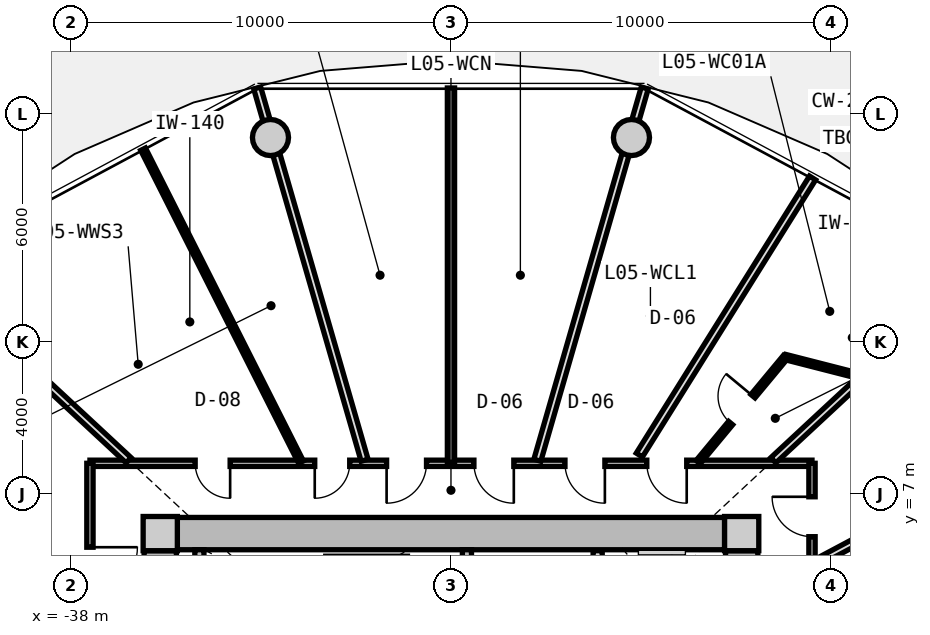
"""IFC4 building model, lengths in metres.
Left out: names, types, materials, properties, quantities, classifications, styles, units other than length and angle.
Written with IfcOpenShell. Run it as: python <this file> out.ifc"""

import sys

from ifc_helpers import new_model, si_unit, direction, frame, frame_2d, origin, origin_2d, place, context, subcontext, project, spatial, rectangle, circle, extrude, source, transform, mapped, element, fill, save


model = new_model("IFC4")
c1 = context("Model", 3, precision=1e-05, world=origin(), true_north=direction((0.0, 1.0)))
c2 = subcontext(c1, "Body", "Model", "MODEL_VIEW")
j1 = project(units=[si_unit("LENGTHUNIT", "METRE"), si_unit("PLANEANGLEUNIT", "RADIAN")], contexts=[c1])
p1 = place(None, origin())
s1 = spatial("IfcSite", under=j1, at=p1, CompositionType="ELEMENT")
p2 = place(p1, origin())
s2 = spatial("IfcBuilding", under=s1, at=p2, CompositionType="ELEMENT")
p3 = place(p2, frame((0.0, 0.0, 21.6)))
s3 = spatial("IfcBuildingStorey", under=s2, at=p3, CompositionType="ELEMENT", Elevation=21.6)
m1 = source(origin(), c2, "Body", "SweptSolid", [
    extrude(rectangle(XDim=0.9, YDim=0.9, at=origin_2d()), origin(), (0.0, 0.0, 1.0), 3.05),
])
for number, where, z_axis, x_axis in (
    (1, (-20.35, 5.95, 0.0), (0.0, 0.0, 1.0), (1.0, 0.0, 0.0)),
    (2, (-35.65, 5.95, 0.0), (0.0, 0.0, 1.0), (1.0, 0.0, 0.0)),
):
    element("IfcColumn", number, at=place(p3, frame(where, z_axis=z_axis, x_axis=x_axis)), inside=s3, PredefinedType="COLUMN", context=c2, shape_type="MappedRepresentation", body=[
        mapped(m1, transform((0.0, 0.0, 0.0), x_axis=(1.0, 0.0, 0.0), y_axis=(0.0, 1.0, 0.0), z_axis=(0.0, 0.0, 1.0), scale=1.0)),
    ])
m2 = source(origin(), c2, "Body", "SweptSolid", [
    extrude(rectangle(XDim=14.4, YDim=0.85, at=frame_2d((7.2, 0.0))), origin(), (0.0, 0.0, 1.0), 2.79),
])
p4 = place(p3, frame((-35.2, 5.95, 0.0), z_axis=(0.0, 0.0, 1.0), x_axis=(1.0, 0.0, 0.0)))
e3 = element("IfcWall", 3, at=p4, inside=s3, PredefinedType="SHEAR", context=c2, shape_type="MappedRepresentation", body=[
    mapped(m2, transform((0.0, 0.0, 0.0), x_axis=(1.0, 0.0, 0.0), y_axis=(0.0, 1.0, 0.0), z_axis=(0.0, 0.0, 1.0), scale=1.0)),
])
m3 = source(origin(), c2, "Body", "SweptSolid", [
    extrude(rectangle(XDim=11.0, YDim=0.85, at=frame_2d((5.5, 0.0))), origin(), (0.0, 0.0, 1.0), 2.79),
])
p5 = place(p3, frame((-35.65, -5.5, 0.0), z_axis=(0.0, 0.0, 1.0), x_axis=(0.0, 1.0, 0.0)))
e4 = element("IfcWall", 4, at=p5, inside=s3, PredefinedType="SHEAR", context=c2, shape_type="MappedRepresentation", body=[
    mapped(m3, transform((0.0, 0.0, 0.0), x_axis=(1.0, 0.0, 0.0), y_axis=(0.0, 1.0, 0.0), z_axis=(0.0, 0.0, 1.0), scale=1.0)),
])
p6 = place(p5, frame((3.8, 0.0, 0.0)))
e5 = element("IfcOpeningElement", 5, at=p6, cuts=e4, PredefinedType="OPENING", context=c2, shape_type="SweptSolid", body=[
    extrude(rectangle(XDim=1.2, YDim=2.15, at=frame_2d((0.6, 1.075))), frame((0.0, 0.435, 0.0), z_axis=(0.0, -1.0, 0.0), x_axis=(1.0, 0.0, 0.0)), (0.0, 0.0, 1.0), 0.87),
])
p7 = place(p3, frame((-20.35, 5.5, 0.0), z_axis=(0.0, 0.0, 1.0), x_axis=(0.0, -1.0, 0.0)))
e6 = element("IfcWall", 6, at=p7, inside=s3, PredefinedType="SHEAR", context=c2, shape_type="MappedRepresentation", body=[
    mapped(m3, transform((0.0, 0.0, 0.0), x_axis=(1.0, 0.0, 0.0), y_axis=(0.0, 1.0, 0.0), z_axis=(0.0, 0.0, 1.0), scale=1.0)),
])
p8 = place(p7, frame((5.65, 0.0, 0.0)))
e7 = element("IfcOpeningElement", 7, at=p8, cuts=e6, PredefinedType="OPENING", context=c2, shape_type="SweptSolid", body=[
    extrude(rectangle(XDim=1.2, YDim=2.15, at=frame_2d((0.6, 1.075))), frame((0.0, 0.435, 0.0), z_axis=(0.0, -1.0, 0.0), x_axis=(1.0, 0.0, 0.0)), (0.0, 0.0, 1.0), 0.87),
])
p9 = place(p7, frame((9.3, 0.0, 0.0)))
e8 = element("IfcOpeningElement", 8, at=p9, cuts=e6, PredefinedType="OPENING", context=c2, shape_type="SweptSolid", body=[
    extrude(rectangle(XDim=1.0, YDim=2.1, at=frame_2d((0.5, 1.05))), frame((0.0, 0.435, 0.0), z_axis=(0.0, -1.0, 0.0), x_axis=(1.0, 0.0, 0.0)), (0.0, 0.0, 1.0), 0.87),
])
m4 = source(origin(), c2, "Body", "SweptSolid", [
    extrude(circle(Radius=0.475, at=origin_2d()), origin(), (0.0, 0.0, 1.0), 3.47),
])
for number, where, z_axis, x_axis in (
    (9, (-23.251, 16.373, -0.42), (0.0, 0.0, 1.0), (1.0, 0.0, 0.0)),
    (10, (-32.749, 16.373, -0.42), (0.0, 0.0, 1.0), (1.0, 0.0, 0.0)),
):
    element("IfcColumn", number, at=place(p3, frame(where, z_axis=z_axis, x_axis=x_axis)), inside=s3, PredefinedType="COLUMN", context=c2, shape_type="MappedRepresentation", body=[
        mapped(m4, transform((0.0, 0.0, 0.0), x_axis=(1.0, 0.0, 0.0), y_axis=(0.0, 1.0, 0.0), z_axis=(0.0, 0.0, 1.0), scale=1.0)),
    ])
m5 = source(origin(), c2, "Body", "SweptSolid", [
    extrude(rectangle(XDim=3.075, YDim=0.24, at=frame_2d((1.538, 0.0))), origin(), (0.0, 0.0, 1.0), 2.79),
])
p10 = place(p3, frame((-34.62, 2.45, 0.0), z_axis=(0.0, 0.0, 1.0), x_axis=(0.0, 1.0, 0.0)))
e11 = element("IfcWall", 11, at=p10, inside=s3, PredefinedType="PARTITIONING", context=c2, shape_type="MappedRepresentation", body=[
    mapped(m5, transform((0.0, 0.0, 0.0), x_axis=(1.0, 0.0, 0.0), y_axis=(0.0, 1.0, 0.0), z_axis=(0.0, 0.0, 1.0), scale=1.0)),
])
p11 = place(p3, frame((-27.58, 2.45, 0.0), z_axis=(0.0, 0.0, 1.0), x_axis=(0.0, 1.0, 0.0)))
e12 = element("IfcWall", 12, at=p11, inside=s3, PredefinedType="PARTITIONING", context=c2, shape_type="MappedRepresentation", body=[
    mapped(m5, transform((0.0, 0.0, 0.0), x_axis=(1.0, 0.0, 0.0), y_axis=(0.0, 1.0, 0.0), z_axis=(0.0, 0.0, 1.0), scale=1.0)),
])
p12 = place(p11, frame((0.55, 0.0, 0.0)))
e13 = element("IfcOpeningElement", 13, at=p12, cuts=e12, PredefinedType="OPENING", context=c2, shape_type="SweptSolid", body=[
    extrude(rectangle(XDim=1.1, YDim=2.15, at=frame_2d((0.55, 1.075))), frame((0.0, 0.13, 0.0), z_axis=(0.0, -1.0, 0.0), x_axis=(1.0, 0.0, 0.0)), (0.0, 0.0, 1.0), 0.26),
])
m6 = source(origin(), c2, "Body", "SweptSolid", [
    extrude(rectangle(XDim=5.0, YDim=0.24, at=frame_2d((2.5, 0.0))), origin(), (0.0, 0.0, 1.0), 2.775),
])
p13 = place(p3, frame((-24.14, 0.5, 0.0), z_axis=(0.0, 0.0, 1.0), x_axis=(0.0, 1.0, 0.0)))
e14 = element("IfcWall", 14, at=p13, inside=s3, PredefinedType="PARTITIONING", context=c2, shape_type="MappedRepresentation", body=[
    mapped(m6, transform((0.0, 0.0, 0.0), x_axis=(1.0, 0.0, 0.0), y_axis=(0.0, 1.0, 0.0), z_axis=(0.0, 0.0, 1.0), scale=1.0)),
])
p14 = place(p13, frame((3.05, 0.0, 0.0)))
e15 = element("IfcOpeningElement", 15, at=p14, cuts=e14, PredefinedType="OPENING", context=c2, shape_type="SweptSolid", body=[
    extrude(rectangle(XDim=1.3, YDim=2.2, at=frame_2d((0.65, 1.1))), frame((0.0, 0.13, 0.0), z_axis=(0.0, -1.0, 0.0), x_axis=(1.0, 0.0, 0.0)), (0.0, 0.0, 1.0), 0.26),
])
p15 = place(p13, frame((0.55, 0.0, 0.0)))
e16 = element("IfcOpeningElement", 16, at=p15, cuts=e14, PredefinedType="OPENING", context=c2, shape_type="SweptSolid", body=[
    extrude(rectangle(XDim=1.3, YDim=2.2, at=frame_2d((0.65, 1.1))), frame((0.0, 0.13, 0.0), z_axis=(0.0, -1.0, 0.0), x_axis=(1.0, 0.0, 0.0)), (0.0, 0.0, 1.0), 0.26),
])
m7 = source(origin(), c2, "Body", "SweptSolid", [
    extrude(rectangle(XDim=19.0, YDim=0.165, at=frame_2d((9.5, 0.0))), origin(), (0.0, 0.0, 1.0), 2.775),
])
p16 = place(p3, frame((-37.5, 7.8, 0.0), z_axis=(0.0, 0.0, 1.0), x_axis=(1.0, 0.0, 0.0)))
e17 = element("IfcWall", 17, at=p16, inside=s3, PredefinedType="PARTITIONING", context=c2, shape_type="MappedRepresentation", body=[
    mapped(m7, transform((0.0, 0.0, 0.0), x_axis=(1.0, 0.0, 0.0), y_axis=(0.0, 1.0, 0.0), z_axis=(0.0, 0.0, 1.0), scale=1.0)),
])
p17 = place(p16, frame((14.653, 0.0, 0.0)))
e18 = element("IfcOpeningElement", 18, at=p17, cuts=e17, PredefinedType="OPENING", context=c2, shape_type="SweptSolid", body=[
    extrude(rectangle(XDim=1.05, YDim=2.15, at=frame_2d((0.525, 1.075))), frame((0.0, 0.093, 0.0), z_axis=(0.0, -1.0, 0.0), x_axis=(1.0, 0.0, 0.0)), (0.0, 0.0, 1.0), 0.185),
])
p18 = place(p16, frame((12.5, 0.0, 0.0)))
e19 = element("IfcOpeningElement", 19, at=p18, cuts=e17, PredefinedType="OPENING", context=c2, shape_type="SweptSolid", body=[
    extrude(rectangle(XDim=1.05, YDim=2.15, at=frame_2d((0.525, 1.075))), frame((0.0, 0.093, 0.0), z_axis=(0.0, -1.0, 0.0), x_axis=(1.0, 0.0, 0.0)), (0.0, 0.0, 1.0), 0.185),
])
p19 = place(p16, frame((10.104, 0.0, 0.0)))
e20 = element("IfcOpeningElement", 20, at=p19, cuts=e17, PredefinedType="OPENING", context=c2, shape_type="SweptSolid", body=[
    extrude(rectangle(XDim=1.05, YDim=2.15, at=frame_2d((0.525, 1.075))), frame((0.0, 0.093, 0.0), z_axis=(0.0, -1.0, 0.0), x_axis=(1.0, 0.0, 0.0)), (0.0, 0.0, 1.0), 0.185),
])
p20 = place(p16, frame((7.806, 0.0, 0.0)))
e21 = element("IfcOpeningElement", 21, at=p20, cuts=e17, PredefinedType="OPENING", context=c2, shape_type="SweptSolid", body=[
    extrude(rectangle(XDim=1.05, YDim=2.15, at=frame_2d((0.525, 1.075))), frame((0.0, 0.093, 0.0), z_axis=(0.0, -1.0, 0.0), x_axis=(1.0, 0.0, 0.0)), (0.0, 0.0, 1.0), 0.185),
])
p21 = place(p16, frame((5.915, 0.0, 0.0)))
e22 = element("IfcOpeningElement", 22, at=p21, cuts=e17, PredefinedType="OPENING", context=c2, shape_type="SweptSolid", body=[
    extrude(rectangle(XDim=0.92, YDim=2.1, at=frame_2d((0.46, 1.05))), frame((0.0, 0.093, 0.0), z_axis=(0.0, -1.0, 0.0), x_axis=(1.0, 0.0, 0.0)), (0.0, 0.0, 1.0), 0.185),
])
p22 = place(p16, frame((2.769, 0.0, 0.0)))
e23 = element("IfcOpeningElement", 23, at=p22, cuts=e17, PredefinedType="OPENING", context=c2, shape_type="SweptSolid", body=[
    extrude(rectangle(XDim=0.92, YDim=2.1, at=frame_2d((0.46, 1.05))), frame((0.0, 0.093, 0.0), z_axis=(0.0, -1.0, 0.0), x_axis=(1.0, 0.0, 0.0)), (0.0, 0.0, 1.0), 0.185),
])
m8 = source(origin(), c2, "Body", "SweptSolid", [
    extrude(rectangle(XDim=15.6, YDim=0.165, at=frame_2d((7.8, 0.0))), origin(), (0.0, 0.0, 1.0), 2.775),
])
p23 = place(p3, frame((-37.5, -7.8, 0.0), z_axis=(0.0, 0.0, 1.0), x_axis=(0.0, 1.0, 0.0)))
e24 = element("IfcWall", 24, at=p23, inside=s3, PredefinedType="PARTITIONING", context=c2, shape_type="MappedRepresentation", body=[
    mapped(m8, transform((0.0, 0.0, 0.0), x_axis=(1.0, 0.0, 0.0), y_axis=(0.0, 1.0, 0.0), z_axis=(0.0, 0.0, 1.0), scale=1.0)),
])
p24 = place(p23, frame((12.141, 0.0, 0.0)))
e25 = element("IfcOpeningElement", 25, at=p24, cuts=e24, PredefinedType="OPENING", context=c2, shape_type="SweptSolid", body=[
    extrude(rectangle(XDim=1.25, YDim=2.2, at=frame_2d((0.625, 1.1))), frame((0.0, 0.093, 0.0), z_axis=(0.0, -1.0, 0.0), x_axis=(1.0, 0.0, 0.0)), (0.0, 0.0, 1.0), 0.185),
])
p25 = place(p23, frame((7.175, 0.0, 0.0)))
e26 = element("IfcOpeningElement", 26, at=p25, cuts=e24, PredefinedType="OPENING", context=c2, shape_type="SweptSolid", body=[
    extrude(rectangle(XDim=1.25, YDim=2.2, at=frame_2d((0.625, 1.1))), frame((0.0, 0.093, 0.0), z_axis=(0.0, -1.0, 0.0), x_axis=(1.0, 0.0, 0.0)), (0.0, 0.0, 1.0), 0.185),
])
p26 = place(p23, frame((2.208, 0.0, 0.0)))
e27 = element("IfcOpeningElement", 27, at=p26, cuts=e24, PredefinedType="OPENING", context=c2, shape_type="SweptSolid", body=[
    extrude(rectangle(XDim=1.25, YDim=2.2, at=frame_2d((0.625, 1.1))), frame((0.0, 0.093, 0.0), z_axis=(0.0, -1.0, 0.0), x_axis=(1.0, 0.0, 0.0)), (0.0, 0.0, 1.0), 0.185),
])
p27 = place(p3, frame((-18.5, 7.8, 0.0), z_axis=(0.0, 0.0, 1.0), x_axis=(0.0, -1.0, 0.0)))
e28 = element("IfcWall", 28, at=p27, inside=s3, PredefinedType="PARTITIONING", context=c2, shape_type="MappedRepresentation", body=[
    mapped(m8, transform((0.0, 0.0, 0.0), x_axis=(1.0, 0.0, 0.0), y_axis=(0.0, 1.0, 0.0), z_axis=(0.0, 0.0, 1.0), scale=1.0)),
])
p28 = place(p27, frame((12.141, 0.0, 0.0)))
e29 = element("IfcOpeningElement", 29, at=p28, cuts=e28, PredefinedType="OPENING", context=c2, shape_type="SweptSolid", body=[
    extrude(rectangle(XDim=1.25, YDim=2.2, at=frame_2d((0.625, 1.1))), frame((0.0, 0.093, 0.0), z_axis=(0.0, -1.0, 0.0), x_axis=(1.0, 0.0, 0.0)), (0.0, 0.0, 1.0), 0.185),
])
p29 = place(p27, frame((7.175, 0.0, 0.0)))
e30 = element("IfcOpeningElement", 30, at=p29, cuts=e28, PredefinedType="OPENING", context=c2, shape_type="SweptSolid", body=[
    extrude(rectangle(XDim=1.25, YDim=2.2, at=frame_2d((0.625, 1.1))), frame((0.0, 0.093, 0.0), z_axis=(0.0, -1.0, 0.0), x_axis=(1.0, 0.0, 0.0)), (0.0, 0.0, 1.0), 0.185),
])
p30 = place(p27, frame((2.826, 0.0, 0.0)))
e31 = element("IfcOpeningElement", 31, at=p30, cuts=e28, PredefinedType="OPENING", context=c2, shape_type="SweptSolid", body=[
    extrude(rectangle(XDim=1.05, YDim=2.15, at=frame_2d((0.525, 1.075))), frame((0.0, 0.093, 0.0), z_axis=(0.0, -1.0, 0.0), x_axis=(1.0, 0.0, 0.0)), (0.0, 0.0, 1.0), 0.185),
])
p31 = place(p27, frame((0.881, 0.0, 0.0)))
e32 = element("IfcOpeningElement", 32, at=p31, cuts=e28, PredefinedType="OPENING", context=c2, shape_type="SweptSolid", body=[
    extrude(rectangle(XDim=1.05, YDim=2.15, at=frame_2d((0.525, 1.075))), frame((0.0, 0.093, 0.0), z_axis=(0.0, -1.0, 0.0), x_axis=(1.0, 0.0, 0.0)), (0.0, 0.0, 1.0), 0.185),
])
m9 = source(origin(), c2, "Body", "SweptSolid", [
    extrude(rectangle(XDim=7.435, YDim=0.19, at=frame_2d((3.717, 0.0))), origin(), (0.0, 0.0, 1.0), 2.225),
])
p32 = place(p3, frame((-19.517, 7.88, 0.0), z_axis=(0.0, 0.0, 1.0), x_axis=(0.732651956848, 0.680603489652, 0.0)))
e33 = element("IfcWall", 33, at=p32, inside=s3, PredefinedType="PARTITIONING", context=c2, shape_type="MappedRepresentation", body=[
    mapped(m9, transform((0.0, 0.0, 0.0), x_axis=(1.0, 0.0, 0.0), y_axis=(0.0, 1.0, 0.0), z_axis=(0.0, 0.0, 1.0), scale=1.0)),
])
m10 = source(origin(), c2, "Body", "SweptSolid", [
    extrude(rectangle(XDim=10.196, YDim=0.19, at=frame_2d((5.098, 0.0))), origin(), (0.0, 0.0, 1.0), 2.225),
])
p33 = place(p3, frame((-25.727, 7.88, 0.0), z_axis=(0.0, 0.0, 1.0), x_axis=(0.277136420347, 0.960830580549, 0.0)))
e34 = element("IfcWall", 34, at=p33, inside=s3, PredefinedType="PARTITIONING", context=c2, shape_type="MappedRepresentation", body=[
    mapped(m10, transform((0.0, 0.0, 0.0), x_axis=(1.0, 0.0, 0.0), y_axis=(0.0, 1.0, 0.0), z_axis=(0.0, 0.0, 1.0), scale=1.0)),
])
m11 = source(origin(), c2, "Body", "SweptSolid", [
    extrude(rectangle(XDim=8.598, YDim=0.19, at=frame_2d((4.299, 0.0))), origin(), (0.0, 0.0, 1.0), 2.775),
])
p34 = place(p3, frame((-23.043, 8.017, 0.0), z_axis=(0.0, 0.0, 1.0), x_axis=(0.530039776395, 0.847972779893, 0.0)))
e35 = element("IfcWall", 35, at=p34, inside=s3, PredefinedType="PARTITIONING", context=c2, shape_type="MappedRepresentation", body=[
    mapped(m11, transform((0.0, 0.0, 0.0), x_axis=(1.0, 0.0, 0.0), y_axis=(0.0, 1.0, 0.0), z_axis=(0.0, 0.0, 1.0), scale=1.0)),
])
m12 = source(origin(), c2, "Body", "SweptSolid", [
    extrude(rectangle(XDim=3.594, YDim=0.14, at=frame_2d((1.797, 0.0))), origin(), (0.0, 0.0, 1.0), 2.775),
])
p35 = place(p3, frame((-21.496, 7.83, 0.0), z_axis=(0.0, 0.0, 1.0), x_axis=(0.639001147083, 0.769205781326, 0.0)))
e36 = element("IfcWall", 36, at=p35, inside=s3, PredefinedType="PARTITIONING", context=c2, shape_type="MappedRepresentation", body=[
    mapped(m12, transform((0.0, 0.0, 0.0), x_axis=(1.0, 0.0, 0.0), y_axis=(0.0, 1.0, 0.0), z_axis=(0.0, 0.0, 1.0), scale=1.0)),
])
p36 = place(p35, frame((1.337, 0.0, 0.0)))
e37 = element("IfcOpeningElement", 37, at=p36, cuts=e36, PredefinedType="OPENING", context=c2, shape_type="SweptSolid", body=[
    extrude(rectangle(XDim=0.92, YDim=2.1, at=frame_2d((0.46, 1.05))), frame((0.0, 0.08, 0.0), z_axis=(0.0, -1.0, 0.0), x_axis=(1.0, 0.0, 0.0)), (0.0, 0.0, 1.0), 0.16),
])
m13 = source(origin(), c2, "Body", "SweptSolid", [
    extrude(rectangle(XDim=2.062, YDim=0.14, at=frame_2d((1.031, 0.0))), origin(), (0.0, 0.0, 1.0), 2.415),
])
p37 = place(p3, frame((-19.199, 10.595, 0.0), z_axis=(0.0, 0.0, 1.0), x_axis=(0.968776253543, -0.247936626121, 0.0)))
e38 = element("IfcWall", 38, at=p37, inside=s3, PredefinedType="PARTITIONING", context=c2, shape_type="MappedRepresentation", body=[
    mapped(m13, transform((0.0, 0.0, 0.0), x_axis=(1.0, 0.0, 0.0), y_axis=(0.0, 1.0, 0.0), z_axis=(0.0, 0.0, 1.0), scale=1.0)),
])
p38 = place(p3, frame((-30.273, 7.88, 0.0), z_axis=(0.0, 0.0, 1.0), x_axis=(-0.277136420347, 0.960830580549, 0.0)))
e39 = element("IfcWall", 39, at=p38, inside=s3, PredefinedType="PARTITIONING", context=c2, shape_type="MappedRepresentation", body=[
    mapped(m10, transform((0.0, 0.0, 0.0), x_axis=(1.0, 0.0, 0.0), y_axis=(0.0, 1.0, 0.0), z_axis=(0.0, 0.0, 1.0), scale=1.0)),
])
m14 = source(origin(), c2, "Body", "SweptSolid", [
    extrude(rectangle(XDim=9.846, YDim=0.19, at=frame_2d((4.923, 0.0))), origin(), (0.0, 0.0, 1.0), 2.775),
])
p39 = place(p3, frame((-28.0, 7.83, 0.0), z_axis=(0.0, 0.0, 1.0), x_axis=(0.0, 1.0, 0.0)))
e40 = element("IfcWall", 40, at=p39, inside=s3, PredefinedType="PARTITIONING", context=c2, shape_type="MappedRepresentation", body=[
    mapped(m14, transform((0.0, 0.0, 0.0), x_axis=(1.0, 0.0, 0.0), y_axis=(0.0, 1.0, 0.0), z_axis=(0.0, 0.0, 1.0), scale=1.0)),
])
p40 = place(p3, frame((-36.483, 7.88, 0.0), z_axis=(0.0, 0.0, 1.0), x_axis=(-0.732651956848, 0.680603489652, 0.0)))
e41 = element("IfcWall", 41, at=p40, inside=s3, PredefinedType="PARTITIONING", context=c2, shape_type="MappedRepresentation", body=[
    mapped(m9, transform((0.0, 0.0, 0.0), x_axis=(1.0, 0.0, 0.0), y_axis=(0.0, 1.0, 0.0), z_axis=(0.0, 0.0, 1.0), scale=1.0)),
])
m15 = source(origin(), c2, "Body", "SweptSolid", [
    extrude(rectangle(XDim=9.225, YDim=0.14, at=frame_2d((4.613, 0.0))), origin(), (0.0, 0.0, 1.0), 2.775),
])
p41 = place(p3, frame((-31.946, 7.83, 0.0), z_axis=(0.0, 0.0, 1.0), x_axis=(-0.450460543767, 0.892796336523, 0.0)))
e42 = element("IfcWall", 42, at=p41, inside=s3, PredefinedType="PARTITIONING", context=c2, shape_type="MappedRepresentation", body=[
    mapped(m15, transform((0.0, 0.0, 0.0), x_axis=(1.0, 0.0, 0.0), y_axis=(0.0, 1.0, 0.0), z_axis=(0.0, 0.0, 1.0), scale=1.0)),
])
m16 = source(origin(), c2, "Body", "SweptSolid", [
    extrude(rectangle(XDim=7.677, YDim=0.19, at=frame_2d((3.838, 0.0))), origin(), (0.0, 0.0, 1.0), 2.775),
])
p42 = place(p3, frame((-18.297, 5.231, 0.0), z_axis=(0.0, 0.0, 1.0), x_axis=(0.882725057546, 0.469889851753, 0.0)))
e43 = element("IfcWall", 43, at=p42, inside=s3, PredefinedType="PARTITIONING", context=c2, shape_type="MappedRepresentation", body=[
    mapped(m16, transform((0.0, 0.0, 0.0), x_axis=(1.0, 0.0, 0.0), y_axis=(0.0, 1.0, 0.0), z_axis=(0.0, 0.0, 1.0), scale=1.0)),
])
m17 = source(origin(), c2, "Body", "SweptSolid", [
    extrude(rectangle(XDim=1.05, YDim=2.15, at=frame_2d((0.525, 1.075))), frame((0.0, 0.025, 0.0), z_axis=(0.0, -1.0, 0.0), x_axis=(1.0, 0.0, 0.0)), (0.0, 0.0, 1.0), 0.05),
])
p43 = place(p17, frame((1.05, 0.0, 0.0), z_axis=(0.0, 0.0, 1.0), x_axis=(-1.0, 0.0, 0.0)))
e44 = element("IfcDoor", 44, at=p43, inside=s3, OperationType="SINGLE_SWING_LEFT", PredefinedType="DOOR", context=c2, shape_type="MappedRepresentation", body=[
    mapped(m17, transform((0.0, 0.0, 0.0), x_axis=(1.0, 0.0, 0.0), y_axis=(0.0, 1.0, 0.0), z_axis=(0.0, 0.0, 1.0), scale=1.0)),
])
fill(e18, e44)
m18 = source(origin(), c2, "Body", "SweptSolid", [
    extrude(rectangle(XDim=0.92, YDim=2.1, at=frame_2d((0.46, 1.05))), frame((0.0, 0.025, 0.0), z_axis=(0.0, -1.0, 0.0), x_axis=(1.0, 0.0, 0.0)), (0.0, 0.0, 1.0), 0.05),
])
p44 = place(p36, origin())
e45 = element("IfcDoor", 45, at=p44, inside=s3, OperationType="SINGLE_SWING_RIGHT", PredefinedType="DOOR", context=c2, shape_type="MappedRepresentation", body=[
    mapped(m18, transform((0.0, 0.0, 0.0), x_axis=(1.0, 0.0, 0.0), y_axis=(0.0, 1.0, 0.0), z_axis=(0.0, 0.0, 1.0), scale=1.0)),
])
fill(e37, e45)
p45 = place(p18, frame((1.05, 0.0, 0.0), z_axis=(0.0, 0.0, 1.0), x_axis=(-1.0, 0.0, 0.0)))
e46 = element("IfcDoor", 46, at=p45, inside=s3, OperationType="SINGLE_SWING_LEFT", PredefinedType="DOOR", context=c2, shape_type="MappedRepresentation", body=[
    mapped(m17, transform((0.0, 0.0, 0.0), x_axis=(1.0, 0.0, 0.0), y_axis=(0.0, 1.0, 0.0), z_axis=(0.0, 0.0, 1.0), scale=1.0)),
])
fill(e19, e46)
p46 = place(p19, frame((1.05, 0.0, 0.0), z_axis=(0.0, 0.0, 1.0), x_axis=(-1.0, 0.0, 0.0)))
e47 = element("IfcDoor", 47, at=p46, inside=s3, OperationType="SINGLE_SWING_LEFT", PredefinedType="DOOR", context=c2, shape_type="MappedRepresentation", body=[
    mapped(m17, transform((0.0, 0.0, 0.0), x_axis=(1.0, 0.0, 0.0), y_axis=(0.0, 1.0, 0.0), z_axis=(0.0, 0.0, 1.0), scale=1.0)),
])
fill(e20, e47)
p47 = place(p20, frame((1.05, 0.0, 0.0), z_axis=(0.0, 0.0, 1.0), x_axis=(-1.0, 0.0, 0.0)))
e48 = element("IfcDoor", 48, at=p47, inside=s3, OperationType="SINGLE_SWING_RIGHT", PredefinedType="DOOR", context=c2, shape_type="MappedRepresentation", body=[
    mapped(m17, transform((0.0, 0.0, 0.0), x_axis=(1.0, 0.0, 0.0), y_axis=(0.0, 1.0, 0.0), z_axis=(0.0, 0.0, 1.0), scale=1.0)),
])
fill(e21, e48)
p48 = place(p21, frame((0.92, 0.0, 0.0), z_axis=(0.0, 0.0, 1.0), x_axis=(-1.0, 0.0, 0.0)))
e49 = element("IfcDoor", 49, at=p48, inside=s3, OperationType="SINGLE_SWING_RIGHT", PredefinedType="DOOR", context=c2, shape_type="MappedRepresentation", body=[
    mapped(m18, transform((0.0, 0.0, 0.0), x_axis=(1.0, 0.0, 0.0), y_axis=(0.0, 1.0, 0.0), z_axis=(0.0, 0.0, 1.0), scale=1.0)),
])
fill(e22, e49)
p49 = place(p22, frame((0.92, 0.0, 0.0), z_axis=(0.0, 0.0, 1.0), x_axis=(-1.0, 0.0, 0.0)))
e50 = element("IfcDoor", 50, at=p49, inside=s3, OperationType="SINGLE_SWING_LEFT", PredefinedType="DOOR", context=c2, shape_type="MappedRepresentation", body=[
    mapped(m18, transform((0.0, 0.0, 0.0), x_axis=(1.0, 0.0, 0.0), y_axis=(0.0, 1.0, 0.0), z_axis=(0.0, 0.0, 1.0), scale=1.0)),
])
fill(e23, e50)
m19 = source(origin(), c2, "Body", "SweptSolid", [
    extrude(rectangle(XDim=1.25, YDim=2.2, at=frame_2d((0.625, 1.1))), frame((0.0, 0.025, 0.0), z_axis=(0.0, -1.0, 0.0), x_axis=(1.0, 0.0, 0.0)), (0.0, 0.0, 1.0), 0.05),
])
p50 = place(p24, frame((1.25, 0.0, 0.0), z_axis=(0.0, 0.0, 1.0), x_axis=(-1.0, 0.0, 0.0)))
e51 = element("IfcDoor", 51, at=p50, inside=s3, OperationType="SINGLE_SWING_LEFT", PredefinedType="DOOR", context=c2, shape_type="MappedRepresentation", body=[
    mapped(m19, transform((0.0, 0.0, 0.0), x_axis=(1.0, 0.0, 0.0), y_axis=(0.0, 1.0, 0.0), z_axis=(0.0, 0.0, 1.0), scale=1.0)),
])
fill(e25, e51)
p51 = place(p31, frame((1.05, 0.0, 0.0), z_axis=(0.0, 0.0, 1.0), x_axis=(-1.0, 0.0, 0.0)))
e52 = element("IfcDoor", 52, at=p51, inside=s3, OperationType="SINGLE_SWING_RIGHT", PredefinedType="DOOR", context=c2, shape_type="MappedRepresentation", body=[
    mapped(m17, transform((0.0, 0.0, 0.0), x_axis=(1.0, 0.0, 0.0), y_axis=(0.0, 1.0, 0.0), z_axis=(0.0, 0.0, 1.0), scale=1.0)),
])
fill(e32, e52)
save(model, sys.argv[1])
